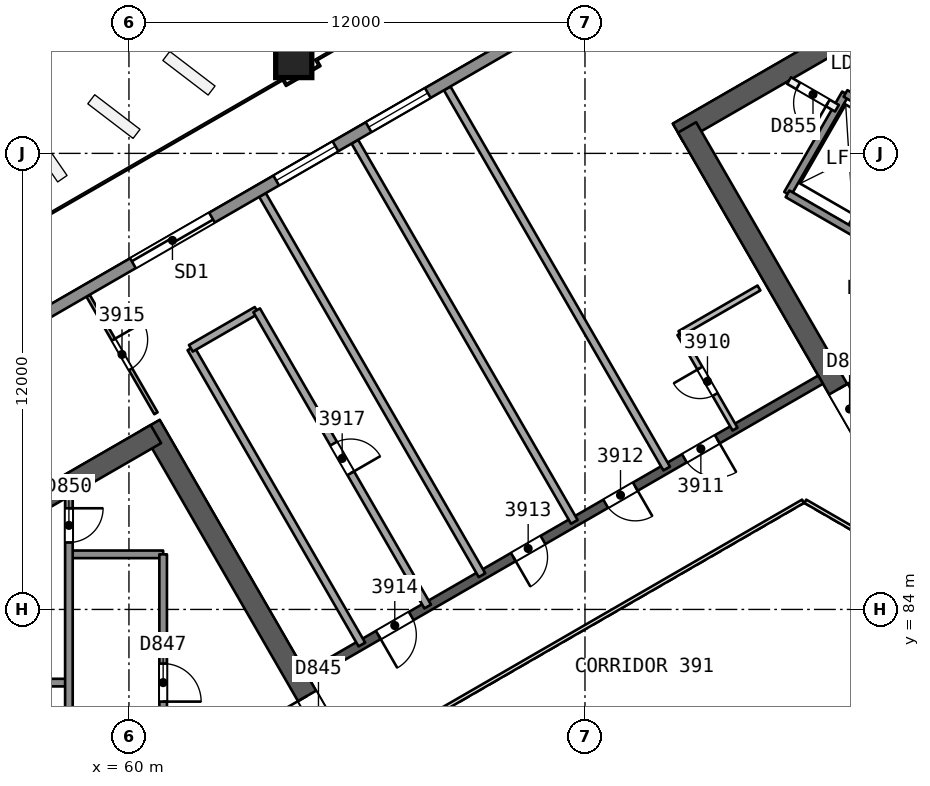
"""IFC4 building model, lengths in metres.
Left out: names, types, materials, properties, quantities, classifications, styles, units other than length and angle.
Written with IfcOpenShell. Run it as: python <this file> out.ifc"""

import sys

from ifc_helpers import new_model, si_unit, direction, frame, frame_2d, origin, origin_2d, place, context, subcontext, project, spatial, rectangle, extrude, element, fill, save


model = new_model("IFC4")
c1 = context("Model", 3, precision=1e-05, world=origin(), true_north=direction((0.0, 1.0)))
c2 = subcontext(c1, "Body", "Model", "MODEL_VIEW")
j1 = project(units=[si_unit("LENGTHUNIT", "METRE"), si_unit("PLANEANGLEUNIT", "RADIAN")], contexts=[c1])
p1 = place(None, origin())
s1 = spatial("IfcSite", under=j1, at=p1, CompositionType="ELEMENT")
p2 = place(p1, origin())
s2 = spatial("IfcBuilding", under=s1, at=p2, CompositionType="ELEMENT")
p3 = place(p2, frame((0.0, 0.0, 163.7)))
s3 = spatial("IfcBuildingStorey", under=s2, at=p3, CompositionType="ELEMENT", Elevation=163.7)
p4 = place(p3, frame((65.682, 80.0, 0.0), z_axis=(0.0, 0.0, 1.0), x_axis=(-0.500000202252, 0.866025287014, 0.0)))
e1 = element("IfcWall", 1, at=p4, inside=s3, PredefinedType="SHEAR", context=c2, shape_type="SweptSolid", body=[
    extrude(rectangle(XDim=10.221, YDim=0.55, at=frame_2d((5.111, 0.0))), origin(), (0.0, 0.0, 1.0), 3.7),
])
p5 = place(p4, frame((0.791, 0.0, 0.0)))
e2 = element("IfcOpeningElement", 2, at=p5, cuts=e1, PredefinedType="OPENING", context=c2, shape_type="SweptSolid", body=[
    extrude(rectangle(XDim=1.2, YDim=2.1, at=frame_2d((0.6, 1.05))), frame((0.0, 0.286, 0.0), z_axis=(0.0, -1.0, 0.0), x_axis=(1.0, 0.0, 0.0)), (0.0, 0.0, 1.0), 0.571),
])
p6 = place(p3, frame((60.709, 88.614, 0.0), z_axis=(0.0, 0.0, 1.0), x_axis=(-0.866020164116, -0.500009075263, 0.0)))
e3 = element("IfcWall", 3, at=p6, inside=s3, PredefinedType="SHEAR", context=c2, shape_type="SweptSolid", body=[
    extrude(rectangle(XDim=14.058, YDim=0.55, at=frame_2d((7.029, 0.0))), origin(), (0.0, 0.0, 1.0), 3.7),
])
p7 = place(p3, frame((86.723, 103.633, 0.0), z_axis=(0.0, 0.0, 1.0), x_axis=(-0.866023530946, -0.500003243837, 0.0)))
e4 = element("IfcWall", 4, at=p7, inside=s3, PredefinedType="SHEAR", context=c2, shape_type="SweptSolid", body=[
    extrude(rectangle(XDim=14.175, YDim=0.55, at=frame_2d((7.087, 0.0))), origin(), (0.0, 0.0, 1.0), 3.7),
])
p8 = place(p3, frame((74.686, 96.683, 0.0), z_axis=(0.0, 0.0, 1.0), x_axis=(0.499997818338, -0.866026663364, 0.0)))
e5 = element("IfcWall", 5, at=p8, inside=s3, PredefinedType="SHEAR", context=c2, shape_type="SweptSolid", body=[
    extrude(rectangle(XDim=10.105, YDim=0.55, at=frame_2d((5.052, 0.0))), origin(), (0.0, 0.0, 1.0), 3.7),
])
p9 = place(p8, frame((7.955, 0.0, 0.0)))
e6 = element("IfcOpeningElement", 6, at=p9, cuts=e5, PredefinedType="OPENING", context=c2, shape_type="SweptSolid", body=[
    extrude(rectangle(XDim=1.2, YDim=2.1, at=frame_2d((0.6, 1.05))), frame((0.0, 0.286, 0.0), z_axis=(0.0, -1.0, 0.0), x_axis=(1.0, 0.0, 0.0)), (0.0, 0.0, 1.0), 0.571),
])
p10 = place(p3, frame((78.2, 90.046, 0.0), z_axis=(0.0, 0.0, 1.0), x_axis=(-0.866026492143, -0.499998114903, 0.0)))
e7 = element("IfcWall", 7, at=p10, inside=s3, PredefinedType="SHEAR", context=c2, shape_type="SweptSolid", body=[
    extrude(rectangle(XDim=15.588, YDim=0.25, at=frame_2d((7.794, 0.0))), origin(), (0.0, 0.0, 1.0), 3.25),
])
p11 = place(p10, frame((3.138, 0.0, 0.0)))
e8 = element("IfcOpeningElement", 8, at=p11, cuts=e7, PredefinedType="OPENING", context=c2, shape_type="SweptSolid", body=[
    extrude(rectangle(XDim=1.0, YDim=2.1, at=frame_2d((0.5, 1.05))), frame((0.0, 0.135, 0.0), z_axis=(0.0, -1.0, 0.0), x_axis=(1.0, 0.0, 0.0)), (0.0, 0.0, 1.0), 0.271),
])
p12 = place(p10, frame((5.629, 0.0, 0.0)))
e9 = element("IfcOpeningElement", 9, at=p12, cuts=e7, PredefinedType="OPENING", context=c2, shape_type="SweptSolid", body=[
    extrude(rectangle(XDim=0.9, YDim=2.1, at=frame_2d((0.45, 1.05))), frame((0.0, 0.135, 0.0), z_axis=(0.0, -1.0, 0.0), x_axis=(1.0, 0.0, 0.0)), (0.0, 0.0, 1.0), 0.271),
])
p13 = place(p10, frame((8.435, 0.0, 0.0)))
e10 = element("IfcOpeningElement", 10, at=p13, cuts=e7, PredefinedType="OPENING", context=c2, shape_type="SweptSolid", body=[
    extrude(rectangle(XDim=0.9, YDim=2.1, at=frame_2d((0.45, 1.05))), frame((0.0, 0.135, 0.0), z_axis=(0.0, -1.0, 0.0), x_axis=(1.0, 0.0, 0.0)), (0.0, 0.0, 1.0), 0.271),
])
p14 = place(p10, frame((12.438, 0.0, 0.0)))
e11 = element("IfcOpeningElement", 11, at=p14, cuts=e7, PredefinedType="OPENING", context=c2, shape_type="SweptSolid", body=[
    extrude(rectangle(XDim=1.0, YDim=2.1, at=frame_2d((0.5, 1.05))), frame((0.0, 0.135, 0.0), z_axis=(0.0, -1.0, 0.0), x_axis=(1.0, 0.0, 0.0)), (0.0, 0.0, 1.0), 0.271),
])
p15 = place(p3, frame((64.325, 98.49, 0.0), z_axis=(0.010093620709, -0.017482414954, 0.999796221231), x_axis=(0.866020200589, 0.50000901209, 8.5616e-08)))
e12 = element("IfcColumn", 12, at=p15, inside=s3, PredefinedType="COLUMN", context=c2, shape_type="SweptSolid", body=[
    extrude(rectangle(XDim=0.95, YDim=0.95, at=origin_2d()), origin(), (0.0, 0.0, 1.0), 3.701),
])
p16 = place(p3, frame((75.948, 88.746, 0.0), z_axis=(0.0, 0.0, 1.0), x_axis=(-0.499987231761, 0.866032775405, 0.0)))
e13 = element("IfcWall", 13, at=p16, inside=s3, PredefinedType="PARTITIONING", context=c2, shape_type="SweptSolid", body=[
    extrude(rectangle(XDim=2.9, YDim=0.15, at=frame_2d((1.45, 0.0))), origin(), (0.0, 0.0, 1.0), 3.25),
])
p17 = place(p16, frame((1.05, 0.0, 0.0)))
e14 = element("IfcOpeningElement", 14, at=p17, cuts=e13, PredefinedType="OPENING", context=c2, shape_type="SweptSolid", body=[
    extrude(rectangle(XDim=0.8, YDim=2.1, at=frame_2d((0.4, 1.05))), frame((0.0, 0.085, 0.0), z_axis=(0.0, -1.0, 0.0), x_axis=(1.0, 0.0, 0.0)), (0.0, 0.0, 1.0), 0.171),
])
p18 = place(p3, frame((74.498, 91.257, 0.0), z_axis=(0.0, 0.0, 1.0), x_axis=(0.866038271014, 0.499977712642, 0.0)))
e15 = element("IfcWall", 15, at=p18, inside=s3, PredefinedType="PARTITIONING", context=c2, shape_type="SweptSolid", body=[
    extrude(rectangle(XDim=2.401, YDim=0.15, at=frame_2d((1.2, 0.0))), origin(), (0.0, 0.0, 1.0), 3.25),
])
for number, where, z_axis, x_axis in (
    (16, (68.374, 97.712, 0.0), (0.0, 0.0, 1.0), (0.5, -0.866, 0.0)),
    (17, (65.944, 96.309, 0.0), (0.0, 0.0, 1.0), (0.5, -0.866, 0.0)),
    (18, (63.514, 94.906, 0.0), (0.0, 0.0, 1.0), (0.5, -0.866, 0.0)),
):
    element("IfcWall", number, at=place(p3, frame(where, z_axis=z_axis, x_axis=x_axis)), inside=s3, PredefinedType="PARTITIONING", context=c2, shape_type="SweptSolid", body=[
        extrude(rectangle(XDim=11.552, YDim=0.2, at=frame_2d((5.776, 0.0))), origin(), (0.0, 0.0, 1.0), 3.25),
    ])
p19 = place(p3, frame((58.924, 92.256, 0.0), z_axis=(0.0, 0.0, 1.0), x_axis=(0.4999827131, -0.866035384151, 0.0)))
e19 = element("IfcWall", 19, at=p19, inside=s3, PredefinedType="PARTITIONING", context=c2, shape_type="SweptSolid", body=[
    extrude(rectangle(XDim=3.573, YDim=0.1, at=frame_2d((1.787, 0.0))), origin(), (0.0, 0.0, 1.0), 3.25),
])
p20 = place(p19, frame((1.336, 0.0, 0.0)))
e20 = element("IfcOpeningElement", 20, at=p20, cuts=e19, PredefinedType="OPENING", context=c2, shape_type="SweptSolid", body=[
    extrude(rectangle(XDim=0.9, YDim=2.1, at=frame_2d((0.45, 1.05))), frame((0.0, 0.061, 0.0), z_axis=(0.0, -1.0, 0.0), x_axis=(1.0, 0.0, 0.0)), (0.0, 0.0, 1.0), 0.121),
])
p21 = place(p3, frame((66.129, 83.077, 0.0), z_axis=(0.0, 0.0, 1.0), x_axis=(-0.5000018851, 0.866024315419, 0.0)))
e21 = element("IfcWall", 21, at=p21, inside=s3, PredefinedType="PARTITIONING", context=c2, shape_type="SweptSolid", body=[
    extrude(rectangle(XDim=9.0, YDim=0.2, at=frame_2d((4.5, 0.0))), origin(), (0.0, 0.0, 1.0), 3.25),
])
p22 = place(p3, frame((61.629, 90.871, 0.0), z_axis=(0.0, 0.0, 1.0), x_axis=(0.866041268327, 0.499972520799, 0.0)))
e22 = element("IfcWall", 22, at=p22, inside=s3, PredefinedType="PARTITIONING", context=c2, shape_type="SweptSolid", body=[
    extrude(rectangle(XDim=2.0, YDim=0.2, at=frame_2d((1.0, 0.0))), origin(), (0.0, 0.0, 1.0), 3.25),
])
p23 = place(p3, frame((63.361, 91.871, 0.0), z_axis=(0.0, 0.0, 1.0), x_axis=(0.5000018851, -0.866024315419, 0.0)))
e23 = element("IfcWall", 23, at=p23, inside=s3, PredefinedType="PARTITIONING", context=c2, shape_type="SweptSolid", body=[
    extrude(rectangle(XDim=9.0, YDim=0.2, at=frame_2d((4.5, 0.0))), origin(), (0.0, 0.0, 1.0), 3.25),
])
p24 = place(p23, frame((4.05, 0.0, 0.0)))
e24 = element("IfcOpeningElement", 24, at=p24, cuts=e23, PredefinedType="OPENING", context=c2, shape_type="SweptSolid", body=[
    extrude(rectangle(XDim=0.9, YDim=2.1, at=frame_2d((0.45, 1.05))), frame((0.0, 0.11, 0.0), z_axis=(0.0, -1.0, 0.0), x_axis=(1.0, 0.0, 0.0)), (0.0, 0.0, 1.0), 0.221),
])
p25 = place(p3, frame((42.189, 82.766, 0.0), z_axis=(0.0, 0.0, 1.0), x_axis=(0.866025862562, 0.499999205373, 0.0)))
e25 = element("IfcWall", 25, at=p25, inside=s3, PredefinedType="SOLIDWALL", context=c2, shape_type="SweptSolid", body=[
    extrude(rectangle(XDim=54.064, YDim=0.3, at=frame_2d((27.032, 0.0))), origin(), (0.0, 0.0, 1.0), 3.25),
])
p26 = place(p25, frame((20.688, 0.0, 0.0)))
e26 = element("IfcOpeningElement", 26, at=p26, cuts=e25, PredefinedType="OPENING", context=c2, shape_type="SweptSolid", body=[
    extrude(rectangle(XDim=2.4, YDim=2.4, at=frame_2d((1.2, 1.2))), frame((0.0, 0.161, 0.0), z_axis=(0.0, -1.0, 0.0), x_axis=(1.0, 0.0, 0.0)), (0.0, 0.0, 1.0), 0.321),
])
p27 = place(p25, frame((9.629, 0.0, 0.0)))
e27 = element("IfcOpeningElement", 27, at=p27, cuts=e25, PredefinedType="OPENING", context=c2, shape_type="SweptSolid", body=[
    extrude(rectangle(XDim=2.4, YDim=2.4, at=frame_2d((1.2, 1.2))), frame((0.0, 0.161, 0.0), z_axis=(0.0, -1.0, 0.0), x_axis=(1.0, 0.0, 0.0)), (0.0, 0.0, 1.0), 0.321),
])
p28 = place(p25, frame((40.951, 0.0, 0.0)))
e28 = element("IfcOpeningElement", 28, at=p28, cuts=e25, PredefinedType="OPENING", context=c2, shape_type="SweptSolid", body=[
    extrude(rectangle(XDim=2.4, YDim=2.4, at=frame_2d((1.2, 1.2))), frame((0.0, 0.161, 0.0), z_axis=(0.0, -1.0, 0.0), x_axis=(1.0, 0.0, 0.0)), (0.0, 0.0, 1.0), 0.321),
])
p29 = place(p25, frame((27.847, 0.0, 0.9)))
e29 = element("IfcOpeningElement", 29, at=p29, cuts=e25, PredefinedType="OPENING", context=c2, shape_type="SweptSolid", body=[
    extrude(rectangle(XDim=1.8, YDim=1.5, at=frame_2d((0.9, 0.75))), frame((0.0, 0.161, 0.0), z_axis=(0.0, -1.0, 0.0), x_axis=(1.0, 0.0, 0.0)), (0.0, 0.0, 1.0), 0.321),
])
p30 = place(p25, frame((25.041, 0.0, 0.9)))
e30 = element("IfcOpeningElement", 30, at=p30, cuts=e25, PredefinedType="OPENING", context=c2, shape_type="SweptSolid", body=[
    extrude(rectangle(XDim=1.8, YDim=1.5, at=frame_2d((0.9, 0.75))), frame((0.0, 0.161, 0.0), z_axis=(0.0, -1.0, 0.0), x_axis=(1.0, 0.0, 0.0)), (0.0, 0.0, 1.0), 0.321),
])
p31 = place(p3, frame((60.9, 85.45, 0.0), z_axis=(0.0, 0.0, 1.0), x_axis=(-1.0, 0.0, 0.0)))
e31 = element("IfcWall", 31, at=p31, inside=s3, PredefinedType="SOLIDWALL", context=c2, shape_type="SweptSolid", body=[
    extrude(rectangle(XDim=2.48, YDim=0.2, at=frame_2d((1.24, 0.0))), origin(), (0.0, 0.0, 1.0), 3.25),
])
p32 = place(p3, frame((58.42, 82.075, 0.0), z_axis=(0.0, 0.0, 1.0), x_axis=(-1.0, 0.0, 0.0)))
e32 = element("IfcWall", 32, at=p32, inside=s3, PredefinedType="SOLIDWALL", context=c2, shape_type="SweptSolid", body=[
    extrude(rectangle(XDim=7.7, YDim=0.2, at=frame_2d((3.85, 0.0))), origin(), (0.0, 0.0, 1.0), 3.25),
])
p33 = place(p3, frame((60.9, 85.45, 0.0), z_axis=(0.0, 0.0, 1.0), x_axis=(0.0, -1.0, 0.0)))
e33 = element("IfcWall", 33, at=p33, inside=s3, PredefinedType="SOLIDWALL", context=c2, shape_type="SweptSolid", body=[
    extrude(rectangle(XDim=10.9, YDim=0.2, at=frame_2d((5.45, 0.0))), origin(), (0.0, 0.0, 1.0), 3.25),
])
p34 = place(p33, frame((2.875, 0.0, 0.0)))
e34 = element("IfcOpeningElement", 34, at=p34, cuts=e33, PredefinedType="OPENING", context=c2, shape_type="SweptSolid", body=[
    extrude(rectangle(XDim=1.0, YDim=2.1, at=frame_2d((0.5, 1.05))), frame((0.0, 0.11, 0.0), z_axis=(0.0, -1.0, 0.0), x_axis=(1.0, 0.0, 0.0)), (0.0, 0.0, 1.0), 0.221),
])
p35 = place(p33, frame((7.375, 0.0, 0.0)))
e35 = element("IfcOpeningElement", 35, at=p35, cuts=e33, PredefinedType="OPENING", context=c2, shape_type="SweptSolid", body=[
    extrude(rectangle(XDim=1.0, YDim=2.1, at=frame_2d((0.5, 1.05))), frame((0.0, 0.11, 0.0), z_axis=(0.0, -1.0, 0.0), x_axis=(1.0, 0.0, 0.0)), (0.0, 0.0, 1.0), 0.221),
])
p36 = place(p3, frame((58.42, 86.974, 0.0), z_axis=(0.0, 0.0, 1.0), x_axis=(0.0, -1.0, 0.0)))
e36 = element("IfcWall", 36, at=p36, inside=s3, PredefinedType="SOLIDWALL", context=c2, shape_type="SweptSolid", body=[
    extrude(rectangle(XDim=10.524, YDim=0.2, at=frame_2d((5.262, 0.0))), origin(), (0.0, 0.0, 1.0), 3.25),
])
p37 = place(p36, frame((0.312, 0.0, 0.0)))
e37 = element("IfcOpeningElement", 37, at=p37, cuts=e36, PredefinedType="OPENING", context=c2, shape_type="SweptSolid", body=[
    extrude(rectangle(XDim=0.9, YDim=2.1, at=frame_2d((0.45, 1.05))), frame((0.0, 0.11, 0.0), z_axis=(0.0, -1.0, 0.0), x_axis=(1.0, 0.0, 0.0)), (0.0, 0.0, 1.0), 0.221),
])
for number, where, z_axis, x_axis in (
    (38, (78.976, 93.986, 0.0), (0.0, 0.0, 1.0), (0.5, 0.866, 0.0)),
    (39, (77.33, 94.936, 0.0), (0.0, 0.0, 1.0), (0.5, 0.866, 0.0)),
):
    element("IfcWall", number, at=place(p3, frame(where, z_axis=z_axis, x_axis=x_axis)), inside=s3, PredefinedType="SOLIDWALL", context=c2, shape_type="SweptSolid", body=[
        extrude(rectangle(XDim=3.05, YDim=0.2, at=frame_2d((1.525, 0.0))), origin(), (0.0, 0.0, 1.0), 3.25),
    ])
p38 = place(p3, frame((86.77, 89.486, 0.0), z_axis=(0.0, 0.0, 1.0), x_axis=(-0.86601811187, 0.500012629753, 0.0)))
e40 = element("IfcWall", 40, at=p38, inside=s3, PredefinedType="SOLIDWALL", context=c2, shape_type="SweptSolid", body=[
    extrude(rectangle(XDim=10.9, YDim=0.2, at=frame_2d((5.45, 0.0))), origin(), (0.0, 0.0, 1.0), 3.25),
])
p39 = place(p38, frame((0.575, 0.0, 0.0)))
e41 = element("IfcOpeningElement", 41, at=p39, cuts=e40, PredefinedType="OPENING", context=c2, shape_type="SweptSolid", body=[
    extrude(rectangle(XDim=1.1, YDim=2.1, at=frame_2d((0.55, 1.05))), frame((0.0, 0.11, 0.0), z_axis=(0.0, -1.0, 0.0), x_axis=(1.0, 0.0, 0.0)), (0.0, 0.0, 1.0), 0.221),
])
p40 = place(p38, frame((2.825, 0.0, 0.0)))
e42 = element("IfcOpeningElement", 42, at=p40, cuts=e40, PredefinedType="OPENING", context=c2, shape_type="SweptSolid", body=[
    extrude(rectangle(XDim=1.1, YDim=2.1, at=frame_2d((0.55, 1.05))), frame((0.0, 0.11, 0.0), z_axis=(0.0, -1.0, 0.0), x_axis=(1.0, 0.0, 0.0)), (0.0, 0.0, 1.0), 0.221),
])
p41 = place(p38, frame((5.075, 0.0, 0.0)))
e43 = element("IfcOpeningElement", 43, at=p41, cuts=e40, PredefinedType="OPENING", context=c2, shape_type="SweptSolid", body=[
    extrude(rectangle(XDim=1.1, YDim=2.1, at=frame_2d((0.55, 1.05))), frame((0.0, 0.11, 0.0), z_axis=(0.0, -1.0, 0.0), x_axis=(1.0, 0.0, 0.0)), (0.0, 0.0, 1.0), 0.221),
])
p42 = place(p38, frame((7.325, 0.0, 0.0)))
e44 = element("IfcOpeningElement", 44, at=p42, cuts=e40, PredefinedType="OPENING", context=c2, shape_type="SweptSolid", body=[
    extrude(rectangle(XDim=1.1, YDim=2.1, at=frame_2d((0.55, 1.05))), frame((0.0, 0.11, 0.0), z_axis=(0.0, -1.0, 0.0), x_axis=(1.0, 0.0, 0.0)), (0.0, 0.0, 1.0), 0.221),
])
p43 = place(p3, frame((78.63, 97.188, 0.0), z_axis=(0.0, 0.0, 1.0), x_axis=(-0.866003949776, 0.500037157592, 0.0)))
e45 = element("IfcWall", 45, at=p43, inside=s3, PredefinedType="PARTITIONING", context=c2, shape_type="SweptSolid", body=[
    extrude(rectangle(XDim=1.455, YDim=0.2, at=frame_2d((0.728, 0.0))), origin(), (0.0, 0.0, 1.0), 3.25),
])
p44 = place(p43, frame((0.278, 0.0, 0.0)))
e46 = element("IfcOpeningElement", 46, at=p44, cuts=e45, PredefinedType="OPENING", context=c2, shape_type="SweptSolid", body=[
    extrude(rectangle(XDim=0.9, YDim=2.1, at=frame_2d((0.45, 1.05))), frame((0.0, 0.11, 0.0), z_axis=(0.0, -1.0, 0.0), x_axis=(1.0, 0.0, 0.0)), (0.0, 0.0, 1.0), 0.221),
])
p45 = place(p3, frame((80.5, 96.627, 0.0), z_axis=(0.0, 0.0, 1.0), x_axis=(-0.86601224135, 0.500022797313, 0.0)))
e47 = element("IfcWall", 47, at=p45, inside=s3, PredefinedType="SOLIDWALL", context=c2, shape_type="SweptSolid", body=[
    extrude(rectangle(XDim=1.9, YDim=0.2, at=frame_2d((0.95, 0.0))), origin(), (0.0, 0.0, 1.0), 3.25),
])
p46 = place(p45, frame((0.4, 0.0, 0.0)))
e48 = element("IfcOpeningElement", 48, at=p46, cuts=e47, PredefinedType="OPENING", context=c2, shape_type="SweptSolid", body=[
    extrude(rectangle(XDim=1.1, YDim=2.1, at=frame_2d((0.55, 1.05))), frame((0.0, 0.11, 0.0), z_axis=(0.0, -1.0, 0.0), x_axis=(1.0, 0.0, 0.0)), (0.0, 0.0, 1.0), 0.221),
])
p47 = place(p3, frame((79.53, 85.846, 0.0), z_axis=(0.0, 0.0, 1.0), x_axis=(-0.866041268327, 0.499972520799, 0.0)))
e49 = element("IfcWall", 49, at=p47, inside=s3, PredefinedType="PARTITIONING", context=c2, shape_type="SweptSolid", body=[
    extrude(rectangle(XDim=2.0, YDim=0.1, at=frame_2d((1.0, 0.0))), origin(), (0.0, 0.0, 1.0), 3.25),
])
p48 = place(p3, frame((77.738, 86.846, 0.0), z_axis=(0.0, 0.0, 1.0), x_axis=(-0.866026658274, -0.499997827154, 0.0)))
e50 = element("IfcWall", 50, at=p48, inside=s3, PredefinedType="PARTITIONING", context=c2, shape_type="SweptSolid", body=[
    extrude(rectangle(XDim=11.588, YDim=0.1, at=frame_2d((5.794, 0.0))), origin(), (0.0, 0.0, 1.0), 3.25),
])
p49 = place(p17, origin())
e51 = element("IfcDoor", 51, at=p49, inside=s3, OperationType="SINGLE_SWING_RIGHT", PredefinedType="NOTDEFINED", context=c2, shape_type="SweptSolid", body=[
    extrude(rectangle(XDim=0.8, YDim=2.1, at=frame_2d((0.4, 1.05))), frame((0.0, 0.025, 0.0), z_axis=(0.0, -1.0, 0.0), x_axis=(1.0, 0.0, 0.0)), (0.0, 0.0, 1.0), 0.05),
])
fill(e14, e51)
p50 = place(p11, origin())
e52 = element("IfcDoor", 52, at=p50, inside=s3, OperationType="SINGLE_SWING_LEFT", PredefinedType="NOTDEFINED", context=c2, shape_type="SweptSolid", body=[
    extrude(rectangle(XDim=1.0, YDim=2.1, at=frame_2d((0.5, 1.05))), frame((0.0, 0.025, 0.0), z_axis=(0.0, -1.0, 0.0), x_axis=(1.0, 0.0, 0.0)), (0.0, 0.0, 1.0), 0.05),
])
fill(e8, e52)
p51 = place(p12, origin())
e53 = element("IfcDoor", 53, at=p51, inside=s3, OperationType="SINGLE_SWING_LEFT", PredefinedType="NOTDEFINED", context=c2, shape_type="SweptSolid", body=[
    extrude(rectangle(XDim=0.9, YDim=2.1, at=frame_2d((0.45, 1.05))), frame((0.0, 0.025, 0.0), z_axis=(0.0, -1.0, 0.0), x_axis=(1.0, 0.0, 0.0)), (0.0, 0.0, 1.0), 0.05),
])
fill(e9, e53)
p52 = place(p13, origin())
e54 = element("IfcDoor", 54, at=p52, inside=s3, OperationType="SINGLE_SWING_RIGHT", PredefinedType="NOTDEFINED", context=c2, shape_type="SweptSolid", body=[
    extrude(rectangle(XDim=0.9, YDim=2.1, at=frame_2d((0.45, 1.05))), frame((0.0, 0.025, 0.0), z_axis=(0.0, -1.0, 0.0), x_axis=(1.0, 0.0, 0.0)), (0.0, 0.0, 1.0), 0.05),
])
fill(e10, e54)
p53 = place(p14, origin())
e55 = element("IfcDoor", 55, at=p53, inside=s3, OperationType="SINGLE_SWING_RIGHT", PredefinedType="NOTDEFINED", context=c2, shape_type="SweptSolid", body=[
    extrude(rectangle(XDim=1.0, YDim=2.1, at=frame_2d((0.5, 1.05))), frame((0.0, 0.025, 0.0), z_axis=(0.0, -1.0, 0.0), x_axis=(1.0, 0.0, 0.0)), (0.0, 0.0, 1.0), 0.05),
])
fill(e11, e55)
p54 = place(p20, origin())
e56 = element("IfcDoor", 56, at=p54, inside=s3, OperationType="SINGLE_SWING_LEFT", PredefinedType="NOTDEFINED", context=c2, shape_type="SweptSolid", body=[
    extrude(rectangle(XDim=0.9, YDim=2.1, at=frame_2d((0.45, 1.05))), frame((0.0, 0.025, 0.0), z_axis=(0.0, -1.0, 0.0), x_axis=(1.0, 0.0, 0.0)), (0.0, 0.0, 1.0), 0.05),
])
fill(e20, e56)
p55 = place(p24, origin())
e57 = element("IfcDoor", 57, at=p55, inside=s3, OperationType="SINGLE_SWING_RIGHT", PredefinedType="NOTDEFINED", context=c2, shape_type="SweptSolid", body=[
    extrude(rectangle(XDim=0.9, YDim=2.1, at=frame_2d((0.45, 1.05))), frame((0.0, 0.025, 0.0), z_axis=(0.0, -1.0, 0.0), x_axis=(1.0, 0.0, 0.0)), (0.0, 0.0, 1.0), 0.05),
])
fill(e24, e57)
p56 = place(p26, origin())
e58 = element("IfcDoor", 58, at=p56, inside=s3, OperationType="SLIDING_TO_LEFT", PredefinedType="NOTDEFINED", context=c2, shape_type="SweptSolid", body=[
    extrude(rectangle(XDim=2.4, YDim=2.4, at=frame_2d((1.2, 1.2))), frame((0.0, 0.025, 0.0), z_axis=(0.0, -1.0, 0.0), x_axis=(1.0, 0.0, 0.0)), (0.0, 0.0, 1.0), 0.05),
])
fill(e26, e58)
p57 = place(p29, origin())
e59 = element("IfcWindow", 59, at=p57, inside=s3, PartitioningType="SINGLE_PANEL", PredefinedType="WINDOW", context=c2, shape_type="SweptSolid", body=[
    extrude(rectangle(XDim=1.8, YDim=1.5, at=frame_2d((0.9, 0.75))), frame((0.0, 0.03, 0.0), z_axis=(0.0, -1.0, 0.0), x_axis=(1.0, 0.0, 0.0)), (0.0, 0.0, 1.0), 0.06),
])
fill(e29, e59)
p58 = place(p30, origin())
e60 = element("IfcWindow", 60, at=p58, inside=s3, PartitioningType="SINGLE_PANEL", PredefinedType="WINDOW", context=c2, shape_type="SweptSolid", body=[
    extrude(rectangle(XDim=1.8, YDim=1.5, at=frame_2d((0.9, 0.75))), frame((0.0, 0.03, 0.0), z_axis=(0.0, -1.0, 0.0), x_axis=(1.0, 0.0, 0.0)), (0.0, 0.0, 1.0), 0.06),
])
fill(e30, e60)
p59 = place(p5, origin())
e61 = element("IfcDoor", 61, at=p59, inside=s3, OperationType="SINGLE_SWING_RIGHT", PredefinedType="NOTDEFINED", context=c2, shape_type="SweptSolid", body=[
    extrude(rectangle(XDim=1.2, YDim=2.1, at=frame_2d((0.6, 1.05))), frame((0.0, 0.025, 0.0), z_axis=(0.0, -1.0, 0.0), x_axis=(1.0, 0.0, 0.0)), (0.0, 0.0, 1.0), 0.05),
])
fill(e2, e61)
p60 = place(p34, origin())
e62 = element("IfcDoor", 62, at=p60, inside=s3, OperationType="SINGLE_SWING_RIGHT", PredefinedType="NOTDEFINED", context=c2, shape_type="SweptSolid", body=[
    extrude(rectangle(XDim=1.0, YDim=2.1, at=frame_2d((0.5, 1.05))), frame((0.0, 0.025, 0.0), z_axis=(0.0, -1.0, 0.0), x_axis=(1.0, 0.0, 0.0)), (0.0, 0.0, 1.0), 0.05),
])
fill(e34, e62)
p61 = place(p37, origin())
e63 = element("IfcDoor", 63, at=p61, inside=s3, OperationType="SINGLE_SWING_LEFT", PredefinedType="NOTDEFINED", context=c2, shape_type="SweptSolid", body=[
    extrude(rectangle(XDim=0.9, YDim=2.1, at=frame_2d((0.45, 1.05))), frame((0.0, 0.025, 0.0), z_axis=(0.0, -1.0, 0.0), x_axis=(1.0, 0.0, 0.0)), (0.0, 0.0, 1.0), 0.05),
])
fill(e37, e63)
p62 = place(p9, origin())
e64 = element("IfcDoor", 64, at=p62, inside=s3, OperationType="SINGLE_SWING_LEFT", PredefinedType="NOTDEFINED", context=c2, shape_type="SweptSolid", body=[
    extrude(rectangle(XDim=1.2, YDim=2.1, at=frame_2d((0.6, 1.05))), frame((0.0, 0.025, 0.0), z_axis=(0.0, -1.0, 0.0), x_axis=(1.0, 0.0, 0.0)), (0.0, 0.0, 1.0), 0.05),
])
fill(e6, e64)
p63 = place(p44, origin())
e65 = element("IfcDoor", 65, at=p63, inside=s3, OperationType="SINGLE_SWING_LEFT", PredefinedType="NOTDEFINED", context=c2, shape_type="SweptSolid", body=[
    extrude(rectangle(XDim=0.9, YDim=2.1, at=frame_2d((0.45, 1.05))), frame((0.0, 0.025, 0.0), z_axis=(0.0, -1.0, 0.0), x_axis=(1.0, 0.0, 0.0)), (0.0, 0.0, 1.0), 0.05),
])
fill(e46, e65)
save(model, sys.argv[1])
